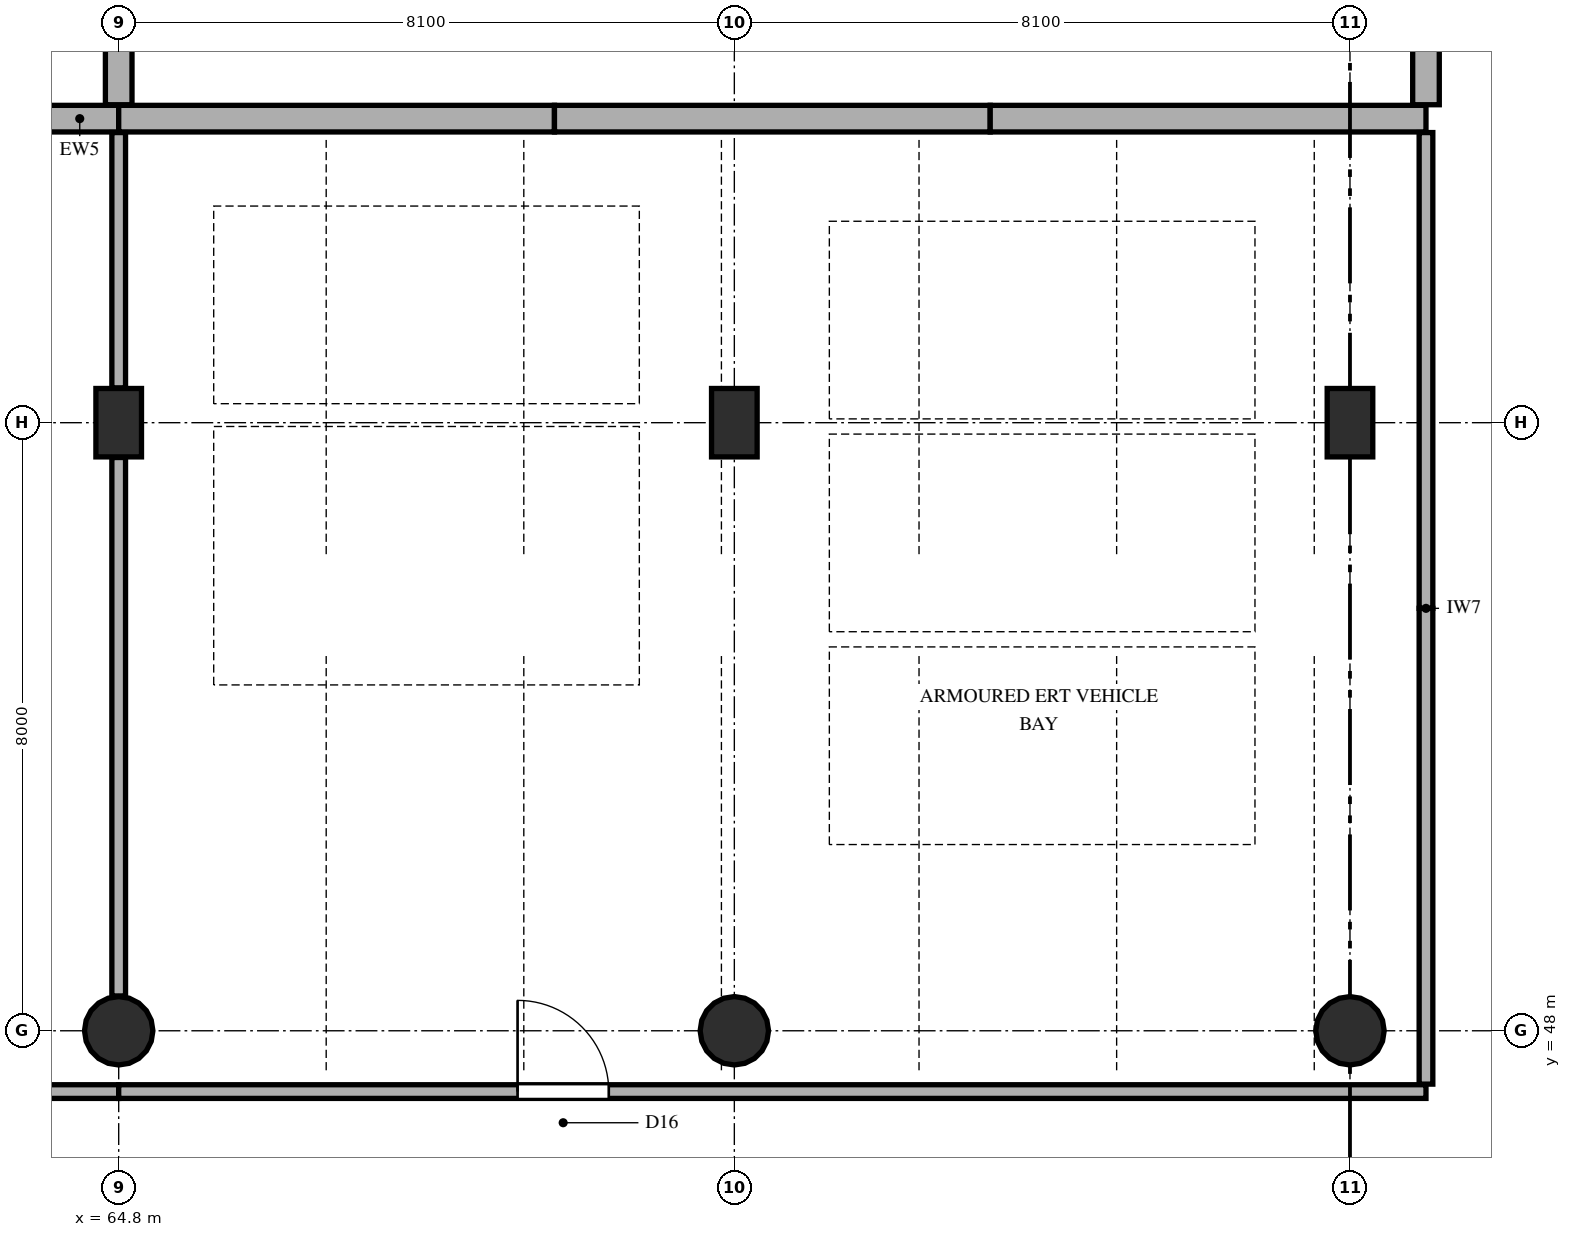
"""IFC4 building model, lengths in metres.
Left out: names, types, materials, properties, quantities, classifications, styles, units other than length and angle.
Written with IfcOpenShell. Run it as: python <this file> out.ifc"""

import sys

from ifc_helpers import new_model, si_unit, direction, frame, frame_2d, origin, origin_2d, place, context, subcontext, project, spatial, rectangle, circle, extrude, element, fill, save


model = new_model("IFC4")
c1 = context("Model", 3, precision=1e-05, world=origin(), true_north=direction((0.0, 1.0)))
c2 = subcontext(c1, "Body", "Model", "MODEL_VIEW")
j1 = project(units=[si_unit("LENGTHUNIT", "METRE"), si_unit("PLANEANGLEUNIT", "RADIAN")], contexts=[c1])
p1 = place(None, origin())
s1 = spatial("IfcSite", under=j1, at=p1, CompositionType="ELEMENT")
p2 = place(p1, origin())
s2 = spatial("IfcBuilding", under=s1, at=p2, CompositionType="ELEMENT")
p3 = place(p2, frame((0.0, 0.0, -4.8)))
s3 = spatial("IfcBuildingStorey", under=s2, at=p3, CompositionType="ELEMENT", Elevation=-4.8)
p4 = place(p3, frame((64.8, 48.0, 0.0), z_axis=(0.0, 0.0, 1.0), x_axis=(1.0, 0.0, 0.0)))
e1 = element("IfcColumn", 1, at=p4, inside=s3, PredefinedType="COLUMN", context=c2, shape_type="SweptSolid", body=[
    extrude(circle(Radius=0.45, at=origin_2d()), origin(), (0.0, 0.0, 1.0), 4.8),
])
p5 = place(p3, frame((64.8, 56.0, 0.0), z_axis=(0.0, 0.0, 1.0), x_axis=(1.0, 0.0, 0.0)))
e2 = element("IfcColumn", 2, at=p5, inside=s3, PredefinedType="COLUMN", context=c2, shape_type="SweptSolid", body=[
    extrude(rectangle(XDim=0.6, YDim=0.9, at=origin_2d()), origin(), (0.0, 0.0, 1.0), 4.8),
])
p6 = place(p3, frame((72.9, 48.0, 0.0), z_axis=(0.0, 0.0, 1.0), x_axis=(1.0, 0.0, 0.0)))
e3 = element("IfcColumn", 3, at=p6, inside=s3, PredefinedType="COLUMN", context=c2, shape_type="SweptSolid", body=[
    extrude(circle(Radius=0.45, at=origin_2d()), origin(), (0.0, 0.0, 1.0), 4.8),
])
p7 = place(p3, frame((72.9, 56.0, 0.0), z_axis=(0.0, 0.0, 1.0), x_axis=(1.0, 0.0, 0.0)))
e4 = element("IfcColumn", 4, at=p7, inside=s3, PredefinedType="COLUMN", context=c2, shape_type="SweptSolid", body=[
    extrude(rectangle(XDim=0.6, YDim=0.9, at=origin_2d()), origin(), (0.0, 0.0, 1.0), 4.8),
])
p8 = place(p3, frame((81.0, 48.0, 0.0), z_axis=(0.0, 0.0, 1.0), x_axis=(1.0, 0.0, 0.0)))
e5 = element("IfcColumn", 5, at=p8, inside=s3, PredefinedType="COLUMN", context=c2, shape_type="SweptSolid", body=[
    extrude(circle(Radius=0.45, at=origin_2d()), origin(), (0.0, 0.0, 1.0), 4.8),
])
p9 = place(p3, frame((81.0, 56.0, 0.0), z_axis=(0.0, 0.0, 1.0), x_axis=(1.0, 0.0, 0.0)))
e6 = element("IfcColumn", 6, at=p9, inside=s3, PredefinedType="COLUMN", context=c2, shape_type="SweptSolid", body=[
    extrude(rectangle(XDim=0.6, YDim=0.9, at=origin_2d()), origin(), (0.0, 0.0, 1.0), 4.8),
])
p10 = place(p3, frame((40.5, 47.2, 0.0), z_axis=(0.0, 0.0, 1.0), x_axis=(1.0, 0.0, 0.0)))
e7 = element("IfcWall", 7, at=p10, inside=s3, PredefinedType="PARTITIONING", context=c2, shape_type="SweptSolid", body=[
    extrude(rectangle(XDim=24.3, YDim=0.18, at=frame_2d((12.15, 0.0))), origin(), (0.0, 0.0, 1.0), 4.45),
])
p11 = place(p10, frame((11.55, 0.0, 0.0)))
e8 = element("IfcOpeningElement", 8, at=p11, cuts=e7, PredefinedType="OPENING", context=c2, shape_type="SweptSolid", body=[
    extrude(rectangle(XDim=1.2, YDim=2.2, at=frame_2d((0.6, 1.1))), frame((0.0, 0.1, 0.0), z_axis=(0.0, -1.0, 0.0), x_axis=(1.0, 0.0, 0.0)), (0.0, 0.0, 1.0), 0.2),
])
p12 = place(p3, frame((58.725, 60.0, 0.0), z_axis=(0.0, 0.0, 1.0), x_axis=(1.0, 0.0, 0.0)))
e9 = element("IfcWall", 9, at=p12, inside=s3, PredefinedType="SOLIDWALL", context=c2, shape_type="SweptSolid", body=[
    extrude(rectangle(XDim=6.075, YDim=0.35, at=frame_2d((3.038, 0.0))), origin(), (0.0, 0.0, 1.0), 4.45),
])
p13 = place(p3, frame((64.8, 47.2, 0.0), z_axis=(0.0, 0.0, 1.0), x_axis=(1.0, 0.0, 0.0)))
e10 = element("IfcWall", 10, at=p13, inside=s3, PredefinedType="PARTITIONING", context=c2, shape_type="SweptSolid", body=[
    extrude(rectangle(XDim=17.2, YDim=0.18, at=frame_2d((8.6, 0.0))), origin(), (0.0, 0.0, 1.0), 4.45),
])
p14 = place(p13, frame((5.248, 0.0, 0.0)))
e11 = element("IfcOpeningElement", 11, at=p14, cuts=e10, PredefinedType="OPENING", context=c2, shape_type="SweptSolid", body=[
    extrude(rectangle(XDim=1.2, YDim=2.2, at=frame_2d((0.6, 1.1))), frame((0.0, 0.1, 0.0), z_axis=(0.0, -1.0, 0.0), x_axis=(1.0, 0.0, 0.0)), (0.0, 0.0, 1.0), 0.2),
])
p15 = place(p3, frame((64.8, 60.0, 0.0), z_axis=(0.0, 0.0, 1.0), x_axis=(1.0, 0.0, 0.0)))
e12 = element("IfcWall", 12, at=p15, inside=s3, PredefinedType="SOLIDWALL", context=c2, shape_type="SweptSolid", body=[
    extrude(rectangle(XDim=5.733, YDim=0.35, at=frame_2d((2.867, 0.0))), origin(), (0.0, 0.0, 1.0), 4.45),
])
p16 = place(p3, frame((70.533, 60.0, 0.0), z_axis=(0.0, 0.0, 1.0), x_axis=(1.0, 0.0, 0.0)))
e13 = element("IfcWall", 13, at=p16, inside=s3, PredefinedType="SOLIDWALL", context=c2, shape_type="SweptSolid", body=[
    extrude(rectangle(XDim=5.733, YDim=0.35, at=frame_2d((2.867, 0.0))), origin(), (0.0, 0.0, 1.0), 4.45),
])
p17 = place(p3, frame((76.267, 60.0, 0.0), z_axis=(0.0, 0.0, 1.0), x_axis=(1.0, 0.0, 0.0)))
e14 = element("IfcWall", 14, at=p17, inside=s3, PredefinedType="SOLIDWALL", context=c2, shape_type="SweptSolid", body=[
    extrude(rectangle(XDim=5.733, YDim=0.35, at=frame_2d((2.867, 0.0))), origin(), (0.0, 0.0, 1.0), 4.45),
])
p18 = place(p3, frame((64.8, 48.458, 0.0), z_axis=(0.0, 0.0, 1.0), x_axis=(0.0, 1.0, 0.0)))
e15 = element("IfcWall", 15, at=p18, inside=s3, PredefinedType="PARTITIONING", context=c2, shape_type="SweptSolid", body=[
    extrude(rectangle(XDim=7.084, YDim=0.18, at=frame_2d((3.542, 0.0))), origin(), (0.0, 0.0, 1.0), 4.45),
])
p19 = place(p3, frame((64.8, 56.458, 0.0), z_axis=(0.0, 0.0, 1.0), x_axis=(0.0, 1.0, 0.0)))
e16 = element("IfcWall", 16, at=p19, inside=s3, PredefinedType="PARTITIONING", context=c2, shape_type="SweptSolid", body=[
    extrude(rectangle(XDim=3.359, YDim=0.18, at=frame_2d((1.679, 0.0))), origin(), (0.0, 0.0, 1.0), 4.45),
])
p20 = place(p3, frame((64.8, 60.183, 0.0), z_axis=(0.0, 0.0, 1.0), x_axis=(0.0, 1.0, 0.0)))
e17 = element("IfcWall", 17, at=p20, inside=s3, PredefinedType="SOLIDWALL", context=c2, shape_type="SweptSolid", body=[
    extrude(rectangle(XDim=3.484, YDim=0.35, at=frame_2d((1.742, 0.0))), origin(), (0.0, 0.0, 1.0), 4.45),
])
p21 = place(p3, frame((82.0, 47.298, 0.0), z_axis=(0.0, 0.0, 1.0), x_axis=(0.0, 1.0, 0.0)))
e18 = element("IfcWall", 18, at=p21, inside=s3, PredefinedType="PARTITIONING", context=c2, shape_type="SweptSolid", body=[
    extrude(rectangle(XDim=6.26, YDim=0.18, at=frame_2d((3.13, 0.0))), origin(), (0.0, 0.0, 1.0), 4.45),
])
p22 = place(p3, frame((82.0, 53.558, 0.0), z_axis=(0.0, 0.0, 1.0), x_axis=(0.0, 1.0, 0.0)))
e19 = element("IfcWall", 19, at=p22, inside=s3, PredefinedType="PARTITIONING", context=c2, shape_type="SweptSolid", body=[
    extrude(rectangle(XDim=6.259, YDim=0.18, at=frame_2d((3.13, 0.0))), origin(), (0.0, 0.0, 1.0), 4.45),
])
p23 = place(p3, frame((82.0, 60.183, 0.0), z_axis=(0.0, 0.0, 1.0), x_axis=(0.0, 1.0, 0.0)))
e20 = element("IfcWall", 20, at=p23, inside=s3, PredefinedType="SOLIDWALL", context=c2, shape_type="SweptSolid", body=[
    extrude(rectangle(XDim=6.878, YDim=0.35, at=frame_2d((3.439, 0.0))), origin(), (0.0, 0.0, 1.0), 4.45),
])
p24 = place(p14, origin())
e21 = element("IfcDoor", 21, at=p24, inside=s3, OperationType="SINGLE_SWING_LEFT", PredefinedType="DOOR", context=c2, shape_type="SweptSolid", body=[
    extrude(rectangle(XDim=1.2, YDim=2.2, at=frame_2d((0.6, 1.1))), frame((0.0, 0.025, 0.0), z_axis=(0.0, -1.0, 0.0), x_axis=(1.0, 0.0, 0.0)), (0.0, 0.0, 1.0), 0.05),
])
fill(e11, e21)
save(model, sys.argv[1])
